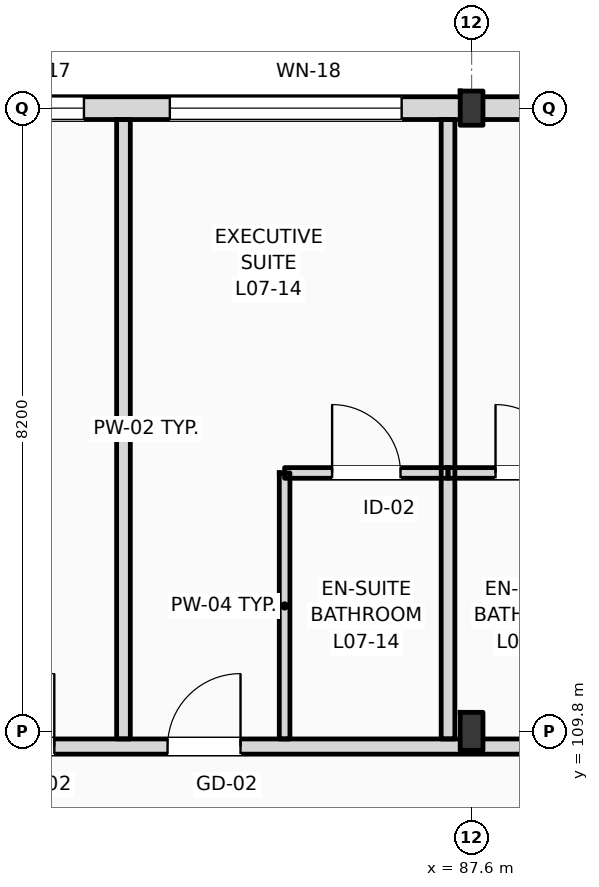
"""IFC4 building model, lengths in metres.
Left out: names, types, materials, properties, quantities, classifications, styles, units other than length and angle.
Written with IfcOpenShell. Run it as: python <this file> out.ifc"""

import sys

from ifc_helpers import new_model, si_unit, direction, frame, frame_2d, origin, origin_2d, place, context, subcontext, project, spatial, rectangle, i_section, extrude, element, fill, save


model = new_model("IFC4")
c1 = context("Model", 3, precision=1e-05, world=origin(), true_north=direction((0.0, 1.0)))
c2 = subcontext(c1, "Body", "Model", "MODEL_VIEW")
j1 = project(units=[si_unit("LENGTHUNIT", "METRE"), si_unit("PLANEANGLEUNIT", "RADIAN")], contexts=[c1])
p1 = place(None, origin())
s1 = spatial("IfcSite", under=j1, at=p1, CompositionType="ELEMENT")
p2 = place(p1, origin())
s2 = spatial("IfcBuilding", under=s1, at=p2, CompositionType="ELEMENT")
p3 = place(p2, frame((0.0, 0.0, 31.8)))
s3 = spatial("IfcBuildingStorey", under=s2, at=p3, CompositionType="ELEMENT", Elevation=31.8)
p4 = place(p3, frame((87.6, 109.8, 0.0), z_axis=(0.0, 0.0, 1.0), x_axis=(1.0, 0.0, 0.0)))
e1 = element("IfcColumn", 1, at=p4, inside=s3, PredefinedType="COLUMN", context=c2, shape_type="SweptSolid", body=[
    extrude(i_section(OverallWidth=0.3, OverallDepth=0.5, WebThickness=0.014, FlangeThickness=0.028, FilletRadius=0.027, at=origin_2d()), origin(), (0.0, 0.0, 1.0), 3.6),
])
p5 = place(p3, frame((87.6, 118.0, 0.0), z_axis=(0.0, 0.0, 1.0), x_axis=(1.0, 0.0, 0.0)))
e2 = element("IfcColumn", 2, at=p5, inside=s3, PredefinedType="COLUMN", context=c2, shape_type="SweptSolid", body=[
    extrude(i_section(OverallWidth=0.3, OverallDepth=0.45, WebThickness=0.014, FlangeThickness=0.026, FilletRadius=0.027, at=origin_2d()), origin(), (0.0, 0.0, 1.0), 3.6),
])
p6 = place(p3, frame((22.5, 118.0, 0.0), z_axis=(0.0, 0.0, 1.0), x_axis=(1.0, 0.0, 0.0)))
e3 = element("IfcWall", 3, at=p6, inside=s3, PredefinedType="STANDARD", context=c2, shape_type="SweptSolid", body=[
    extrude(rectangle(XDim=97.5, YDim=0.3, at=frame_2d((48.75, 0.0))), origin(), (0.0, 0.0, 1.0), 2.72),
])
p7 = place(p6, frame((3.61, 0.0, 0.9)))
e4 = element("IfcOpeningElement", 4, at=p7, cuts=e3, PredefinedType="OPENING", context=c2, shape_type="SweptSolid", body=[
    extrude(rectangle(XDim=1.1, YDim=1.64, at=frame_2d((0.55, 0.82))), frame((0.0, 0.16, 0.0), z_axis=(0.0, -1.0, 0.0), x_axis=(1.0, 0.0, 0.0)), (0.0, 0.0, 1.0), 0.32),
])
p8 = place(p6, frame((6.855, 0.0, 0.0)))
e5 = element("IfcOpeningElement", 5, at=p8, cuts=e3, PredefinedType="OPENING", context=c2, shape_type="SweptSolid", body=[
    extrude(rectangle(XDim=1.2, YDim=2.25, at=frame_2d((0.6, 1.125))), frame((0.0, 0.16, 0.0), z_axis=(0.0, -1.0, 0.0), x_axis=(1.0, 0.0, 0.0)), (0.0, 0.0, 1.0), 0.32),
])
p9 = place(p6, frame((11.405, 0.0, 0.9)))
e6 = element("IfcOpeningElement", 6, at=p9, cuts=e3, PredefinedType="OPENING", context=c2, shape_type="SweptSolid", body=[
    extrude(rectangle(XDim=2.1, YDim=1.64, at=frame_2d((1.05, 0.82))), frame((0.0, 0.16, 0.0), z_axis=(0.0, -1.0, 0.0), x_axis=(1.0, 0.0, 0.0)), (0.0, 0.0, 1.0), 0.32),
])
p10 = place(p6, frame((15.13, 0.0, 0.9)))
e7 = element("IfcOpeningElement", 7, at=p10, cuts=e3, PredefinedType="OPENING", context=c2, shape_type="SweptSolid", body=[
    extrude(rectangle(XDim=2.25, YDim=1.64, at=frame_2d((1.125, 0.82))), frame((0.0, 0.16, 0.0), z_axis=(0.0, -1.0, 0.0), x_axis=(1.0, 0.0, 0.0)), (0.0, 0.0, 1.0), 0.32),
])
p11 = place(p6, frame((21.53, 0.0, 0.0)))
e8 = element("IfcOpeningElement", 8, at=p11, cuts=e3, PredefinedType="OPENING", context=c2, shape_type="SweptSolid", body=[
    extrude(rectangle(XDim=1.2, YDim=2.25, at=frame_2d((0.6, 1.125))), frame((0.0, 0.16, 0.0), z_axis=(0.0, -1.0, 0.0), x_axis=(1.0, 0.0, 0.0)), (0.0, 0.0, 1.0), 0.32),
])
p12 = place(p6, frame((24.18, 0.0, 0.9)))
e9 = element("IfcOpeningElement", 9, at=p12, cuts=e3, PredefinedType="OPENING", context=c2, shape_type="SweptSolid", body=[
    extrude(rectangle(XDim=1.1, YDim=1.64, at=frame_2d((0.55, 0.82))), frame((0.0, 0.16, 0.0), z_axis=(0.0, -1.0, 0.0), x_axis=(1.0, 0.0, 0.0)), (0.0, 0.0, 1.0), 0.32),
])
p13 = place(p6, frame((29.105, 0.0, 0.9)))
e10 = element("IfcOpeningElement", 10, at=p13, cuts=e3, PredefinedType="OPENING", context=c2, shape_type="SweptSolid", body=[
    extrude(rectangle(XDim=2.7, YDim=1.64, at=frame_2d((1.35, 0.82))), frame((0.0, 0.16, 0.0), z_axis=(0.0, -1.0, 0.0), x_axis=(1.0, 0.0, 0.0)), (0.0, 0.0, 1.0), 0.32),
])
p14 = place(p6, frame((34.83, 0.0, 0.9)))
e11 = element("IfcOpeningElement", 11, at=p14, cuts=e3, PredefinedType="OPENING", context=c2, shape_type="SweptSolid", body=[
    extrude(rectangle(XDim=1.8, YDim=1.64, at=frame_2d((0.9, 0.82))), frame((0.0, 0.16, 0.0), z_axis=(0.0, -1.0, 0.0), x_axis=(1.0, 0.0, 0.0)), (0.0, 0.0, 1.0), 0.32),
])
p15 = place(p6, frame((38.525, 0.0, 0.0)))
e12 = element("IfcOpeningElement", 12, at=p15, cuts=e3, PredefinedType="OPENING", context=c2, shape_type="SweptSolid", body=[
    extrude(rectangle(XDim=1.2, YDim=2.25, at=frame_2d((0.6, 1.125))), frame((0.0, 0.16, 0.0), z_axis=(0.0, -1.0, 0.0), x_axis=(1.0, 0.0, 0.0)), (0.0, 0.0, 1.0), 0.32),
])
p16 = place(p6, frame((42.73, 0.0, 0.9)))
e13 = element("IfcOpeningElement", 13, at=p16, cuts=e3, PredefinedType="OPENING", context=c2, shape_type="SweptSolid", body=[
    extrude(rectangle(XDim=3.05, YDim=1.64, at=frame_2d((1.525, 0.82))), frame((0.0, 0.16, 0.0), z_axis=(0.0, -1.0, 0.0), x_axis=(1.0, 0.0, 0.0)), (0.0, 0.0, 1.0), 0.32),
])
p17 = place(p6, frame((47.155, 0.0, 0.9)))
e14 = element("IfcOpeningElement", 14, at=p17, cuts=e3, PredefinedType="OPENING", context=c2, shape_type="SweptSolid", body=[
    extrude(rectangle(XDim=1.35, YDim=1.64, at=frame_2d((0.675, 0.82))), frame((0.0, 0.16, 0.0), z_axis=(0.0, -1.0, 0.0), x_axis=(1.0, 0.0, 0.0)), (0.0, 0.0, 1.0), 0.32),
])
p18 = place(p6, frame((53.065, 0.0, 0.0)))
e15 = element("IfcOpeningElement", 15, at=p18, cuts=e3, PredefinedType="OPENING", context=c2, shape_type="SweptSolid", body=[
    extrude(rectangle(XDim=1.2, YDim=2.25, at=frame_2d((0.6, 1.125))), frame((0.0, 0.16, 0.0), z_axis=(0.0, -1.0, 0.0), x_axis=(1.0, 0.0, 0.0)), (0.0, 0.0, 1.0), 0.32),
])
p19 = place(p6, frame((58.2, 0.0, 0.9)))
e16 = element("IfcOpeningElement", 16, at=p19, cuts=e3, PredefinedType="OPENING", context=c2, shape_type="SweptSolid", body=[
    extrude(rectangle(XDim=1.8, YDim=1.64, at=frame_2d((0.9, 0.82))), frame((0.0, 0.16, 0.0), z_axis=(0.0, -1.0, 0.0), x_axis=(1.0, 0.0, 0.0)), (0.0, 0.0, 1.0), 0.32),
])
p20 = place(p6, frame((61.13, 0.0, 0.9)))
e17 = element("IfcOpeningElement", 17, at=p20, cuts=e3, PredefinedType="OPENING", context=c2, shape_type="SweptSolid", body=[
    extrude(rectangle(XDim=3.05, YDim=1.64, at=frame_2d((1.525, 0.82))), frame((0.0, 0.16, 0.0), z_axis=(0.0, -1.0, 0.0), x_axis=(1.0, 0.0, 0.0)), (0.0, 0.0, 1.0), 0.32),
])
p21 = place(p6, frame((67.93, 0.0, 0.0)))
e18 = element("IfcOpeningElement", 18, at=p21, cuts=e3, PredefinedType="OPENING", context=c2, shape_type="SweptSolid", body=[
    extrude(rectangle(XDim=1.2, YDim=2.25, at=frame_2d((0.6, 1.125))), frame((0.0, 0.16, 0.0), z_axis=(0.0, -1.0, 0.0), x_axis=(1.0, 0.0, 0.0)), (0.0, 0.0, 1.0), 0.32),
])
p22 = place(p6, frame((70.39, 0.0, 0.0)))
e19 = element("IfcOpeningElement", 19, at=p22, cuts=e3, PredefinedType="OPENING", context=c2, shape_type="SweptSolid", body=[
    extrude(rectangle(XDim=1.2, YDim=2.25, at=frame_2d((0.6, 1.125))), frame((0.0, 0.16, 0.0), z_axis=(0.0, -1.0, 0.0), x_axis=(1.0, 0.0, 0.0)), (0.0, 0.0, 1.0), 0.32),
])
p23 = place(p6, frame((75.905, 0.0, 0.9)))
e20 = element("IfcOpeningElement", 20, at=p23, cuts=e3, PredefinedType="OPENING", context=c2, shape_type="SweptSolid", body=[
    extrude(rectangle(XDim=1.1, YDim=1.5, at=frame_2d((0.55, 0.75))), frame((0.0, 0.16, 0.0), z_axis=(0.0, -1.0, 0.0), x_axis=(1.0, 0.0, 0.0)), (0.0, 0.0, 1.0), 0.32),
])
p24 = place(p6, frame((81.63, 0.0, 0.9)))
e21 = element("IfcOpeningElement", 21, at=p24, cuts=e3, PredefinedType="OPENING", context=c2, shape_type="SweptSolid", body=[
    extrude(rectangle(XDim=1.1, YDim=1.6, at=frame_2d((0.55, 0.8))), frame((0.0, 0.16, 0.0), z_axis=(0.0, -1.0, 0.0), x_axis=(1.0, 0.0, 0.0)), (0.0, 0.0, 1.0), 0.32),
])
p25 = place(p6, frame((84.955, 0.0, 0.9)))
e22 = element("IfcOpeningElement", 22, at=p25, cuts=e3, PredefinedType="OPENING", context=c2, shape_type="SweptSolid", body=[
    extrude(rectangle(XDim=1.4, YDim=1.64, at=frame_2d((0.7, 0.82))), frame((0.0, 0.16, 0.0), z_axis=(0.0, -1.0, 0.0), x_axis=(1.0, 0.0, 0.0)), (0.0, 0.0, 1.0), 0.32),
])
p26 = place(p6, frame((90.055, 0.0, 0.9)))
e23 = element("IfcOpeningElement", 23, at=p26, cuts=e3, PredefinedType="OPENING", context=c2, shape_type="SweptSolid", body=[
    extrude(rectangle(XDim=1.6, YDim=1.64, at=frame_2d((0.8, 0.82))), frame((0.0, 0.16, 0.0), z_axis=(0.0, -1.0, 0.0), x_axis=(1.0, 0.0, 0.0)), (0.0, 0.0, 1.0), 0.32),
])
p27 = place(p6, frame((93.87, 0.0, 0.9)))
e24 = element("IfcOpeningElement", 24, at=p27, cuts=e3, PredefinedType="OPENING", context=c2, shape_type="SweptSolid", body=[
    extrude(rectangle(XDim=1.75, YDim=1.64, at=frame_2d((0.875, 0.82))), frame((0.0, 0.16, 0.0), z_axis=(0.0, -1.0, 0.0), x_axis=(1.0, 0.0, 0.0)), (0.0, 0.0, 1.0), 0.32),
])
p28 = place(p3, frame((10.65, 109.6, 0.0), z_axis=(0.0, 0.0, 1.0), x_axis=(1.0, 0.0, 0.0)))
e25 = element("IfcWall", 25, at=p28, inside=s3, PredefinedType="PARTITIONING", context=c2, shape_type="SweptSolid", body=[
    extrude(rectangle(XDim=109.21, YDim=0.2, at=frame_2d((54.605, 0.0))), origin(), (0.0, 0.0, 1.0), 2.72),
])
p29 = place(p28, frame((15.825, 0.0, 0.0)))
e26 = element("IfcOpeningElement", 26, at=p29, cuts=e25, PredefinedType="OPENING", context=c2, shape_type="SweptSolid", body=[
    extrude(rectangle(XDim=1.02, YDim=2.2, at=frame_2d((0.51, 1.1))), frame((0.0, 0.11, 0.0), z_axis=(0.0, -1.0, 0.0), x_axis=(1.0, 0.0, 0.0)), (0.0, 0.0, 1.0), 0.22),
])
p30 = place(p28, frame((19.87, 0.0, 0.0)))
e27 = element("IfcOpeningElement", 27, at=p30, cuts=e25, PredefinedType="OPENING", context=c2, shape_type="SweptSolid", body=[
    extrude(rectangle(XDim=1.02, YDim=2.2, at=frame_2d((0.51, 1.1))), frame((0.0, 0.11, 0.0), z_axis=(0.0, -1.0, 0.0), x_axis=(1.0, 0.0, 0.0)), (0.0, 0.0, 1.0), 0.22),
])
p31 = place(p28, frame((24.47, 0.0, 0.0)))
e28 = element("IfcOpeningElement", 28, at=p31, cuts=e25, PredefinedType="OPENING", context=c2, shape_type="SweptSolid", body=[
    extrude(rectangle(XDim=1.02, YDim=2.2, at=frame_2d((0.51, 1.1))), frame((0.0, 0.11, 0.0), z_axis=(0.0, -1.0, 0.0), x_axis=(1.0, 0.0, 0.0)), (0.0, 0.0, 1.0), 0.22),
])
p32 = place(p28, frame((26.92, 0.0, 0.0)))
e29 = element("IfcOpeningElement", 29, at=p32, cuts=e25, PredefinedType="OPENING", context=c2, shape_type="SweptSolid", body=[
    extrude(rectangle(XDim=1.02, YDim=2.2, at=frame_2d((0.51, 1.1))), frame((0.0, 0.11, 0.0), z_axis=(0.0, -1.0, 0.0), x_axis=(1.0, 0.0, 0.0)), (0.0, 0.0, 1.0), 0.22),
])
p33 = place(p28, frame((33.7, 0.0, 0.0)))
e30 = element("IfcOpeningElement", 30, at=p33, cuts=e25, PredefinedType="OPENING", context=c2, shape_type="SweptSolid", body=[
    extrude(rectangle(XDim=0.96, YDim=2.2, at=frame_2d((0.48, 1.1))), frame((0.0, 0.11, 0.0), z_axis=(0.0, -1.0, 0.0), x_axis=(1.0, 0.0, 0.0)), (0.0, 0.0, 1.0), 0.22),
])
p34 = place(p28, frame((35.9, 0.0, 0.0)))
e31 = element("IfcOpeningElement", 31, at=p34, cuts=e25, PredefinedType="OPENING", context=c2, shape_type="SweptSolid", body=[
    extrude(rectangle(XDim=0.96, YDim=2.2, at=frame_2d((0.48, 1.1))), frame((0.0, 0.11, 0.0), z_axis=(0.0, -1.0, 0.0), x_axis=(1.0, 0.0, 0.0)), (0.0, 0.0, 1.0), 0.22),
])
p35 = place(p28, frame((42.9, 0.0, 0.0)))
e32 = element("IfcOpeningElement", 32, at=p35, cuts=e25, PredefinedType="OPENING", context=c2, shape_type="SweptSolid", body=[
    extrude(rectangle(XDim=0.96, YDim=2.2, at=frame_2d((0.48, 1.1))), frame((0.0, 0.11, 0.0), z_axis=(0.0, -1.0, 0.0), x_axis=(1.0, 0.0, 0.0)), (0.0, 0.0, 1.0), 0.22),
])
p36 = place(p28, frame((47.5, 0.0, 0.0)))
e33 = element("IfcOpeningElement", 33, at=p36, cuts=e25, PredefinedType="OPENING", context=c2, shape_type="SweptSolid", body=[
    extrude(rectangle(XDim=0.96, YDim=2.2, at=frame_2d((0.48, 1.1))), frame((0.0, 0.11, 0.0), z_axis=(0.0, -1.0, 0.0), x_axis=(1.0, 0.0, 0.0)), (0.0, 0.0, 1.0), 0.22),
])
p37 = place(p28, frame((49.95, 0.0, 0.0)))
e34 = element("IfcOpeningElement", 34, at=p37, cuts=e25, PredefinedType="OPENING", context=c2, shape_type="SweptSolid", body=[
    extrude(rectangle(XDim=0.96, YDim=2.2, at=frame_2d((0.48, 1.1))), frame((0.0, 0.11, 0.0), z_axis=(0.0, -1.0, 0.0), x_axis=(1.0, 0.0, 0.0)), (0.0, 0.0, 1.0), 0.22),
])
p38 = place(p28, frame((56.7, 0.0, 0.0)))
e35 = element("IfcOpeningElement", 35, at=p38, cuts=e25, PredefinedType="OPENING", context=c2, shape_type="SweptSolid", body=[
    extrude(rectangle(XDim=0.96, YDim=2.2, at=frame_2d((0.48, 1.1))), frame((0.0, 0.11, 0.0), z_axis=(0.0, -1.0, 0.0), x_axis=(1.0, 0.0, 0.0)), (0.0, 0.0, 1.0), 0.22),
])
p39 = place(p28, frame((59.15, 0.0, 0.0)))
e36 = element("IfcOpeningElement", 36, at=p39, cuts=e25, PredefinedType="OPENING", context=c2, shape_type="SweptSolid", body=[
    extrude(rectangle(XDim=0.96, YDim=2.2, at=frame_2d((0.48, 1.1))), frame((0.0, 0.11, 0.0), z_axis=(0.0, -1.0, 0.0), x_axis=(1.0, 0.0, 0.0)), (0.0, 0.0, 1.0), 0.22),
])
p40 = place(p28, frame((65.9, 0.0, 0.0)))
e37 = element("IfcOpeningElement", 37, at=p40, cuts=e25, PredefinedType="OPENING", context=c2, shape_type="SweptSolid", body=[
    extrude(rectangle(XDim=0.96, YDim=2.2, at=frame_2d((0.48, 1.1))), frame((0.0, 0.11, 0.0), z_axis=(0.0, -1.0, 0.0), x_axis=(1.0, 0.0, 0.0)), (0.0, 0.0, 1.0), 0.22),
])
p41 = place(p28, frame((70.5, 0.0, 0.0)))
e38 = element("IfcOpeningElement", 38, at=p41, cuts=e25, PredefinedType="OPENING", context=c2, shape_type="SweptSolid", body=[
    extrude(rectangle(XDim=0.96, YDim=2.2, at=frame_2d((0.48, 1.1))), frame((0.0, 0.11, 0.0), z_axis=(0.0, -1.0, 0.0), x_axis=(1.0, 0.0, 0.0)), (0.0, 0.0, 1.0), 0.22),
])
p42 = place(p28, frame((72.95, 0.0, 0.0)))
e39 = element("IfcOpeningElement", 39, at=p42, cuts=e25, PredefinedType="OPENING", context=c2, shape_type="SweptSolid", body=[
    extrude(rectangle(XDim=0.96, YDim=2.2, at=frame_2d((0.48, 1.1))), frame((0.0, 0.11, 0.0), z_axis=(0.0, -1.0, 0.0), x_axis=(1.0, 0.0, 0.0)), (0.0, 0.0, 1.0), 0.22),
])
p43 = place(p28, frame((79.7, 0.0, 0.0)))
e40 = element("IfcOpeningElement", 40, at=p43, cuts=e25, PredefinedType="OPENING", context=c2, shape_type="SweptSolid", body=[
    extrude(rectangle(XDim=0.96, YDim=2.2, at=frame_2d((0.48, 1.1))), frame((0.0, 0.11, 0.0), z_axis=(0.0, -1.0, 0.0), x_axis=(1.0, 0.0, 0.0)), (0.0, 0.0, 1.0), 0.22),
])
p44 = place(p28, frame((82.15, 0.0, 0.0)))
e41 = element("IfcOpeningElement", 41, at=p44, cuts=e25, PredefinedType="OPENING", context=c2, shape_type="SweptSolid", body=[
    extrude(rectangle(XDim=0.96, YDim=2.2, at=frame_2d((0.48, 1.1))), frame((0.0, 0.11, 0.0), z_axis=(0.0, -1.0, 0.0), x_axis=(1.0, 0.0, 0.0)), (0.0, 0.0, 1.0), 0.22),
])
p45 = place(p28, frame((88.9, 0.0, 0.0)))
e42 = element("IfcOpeningElement", 42, at=p45, cuts=e25, PredefinedType="OPENING", context=c2, shape_type="SweptSolid", body=[
    extrude(rectangle(XDim=0.96, YDim=2.2, at=frame_2d((0.48, 1.1))), frame((0.0, 0.11, 0.0), z_axis=(0.0, -1.0, 0.0), x_axis=(1.0, 0.0, 0.0)), (0.0, 0.0, 1.0), 0.22),
])
p46 = place(p28, frame((93.75, 0.0, 0.0)))
e43 = element("IfcOpeningElement", 43, at=p46, cuts=e25, PredefinedType="OPENING", context=c2, shape_type="SweptSolid", body=[
    extrude(rectangle(XDim=0.96, YDim=2.2, at=frame_2d((0.48, 1.1))), frame((0.0, 0.11, 0.0), z_axis=(0.0, -1.0, 0.0), x_axis=(1.0, 0.0, 0.0)), (0.0, 0.0, 1.0), 0.22),
])
p47 = place(p28, frame((98.1, 0.0, 0.0)))
e44 = element("IfcOpeningElement", 44, at=p47, cuts=e25, PredefinedType="OPENING", context=c2, shape_type="SweptSolid", body=[
    extrude(rectangle(XDim=0.96, YDim=2.2, at=frame_2d((0.48, 1.1))), frame((0.0, 0.11, 0.0), z_axis=(0.0, -1.0, 0.0), x_axis=(1.0, 0.0, 0.0)), (0.0, 0.0, 1.0), 0.22),
])
p48 = place(p28, frame((102.7, 0.0, 0.0)))
e45 = element("IfcOpeningElement", 45, at=p48, cuts=e25, PredefinedType="OPENING", context=c2, shape_type="SweptSolid", body=[
    extrude(rectangle(XDim=0.96, YDim=2.2, at=frame_2d((0.48, 1.1))), frame((0.0, 0.11, 0.0), z_axis=(0.0, -1.0, 0.0), x_axis=(1.0, 0.0, 0.0)), (0.0, 0.0, 1.0), 0.22),
])
p49 = place(p28, frame((105.04, 0.0, 0.0)))
e46 = element("IfcOpeningElement", 46, at=p49, cuts=e25, PredefinedType="OPENING", context=c2, shape_type="SweptSolid", body=[
    extrude(rectangle(XDim=0.96, YDim=2.2, at=frame_2d((0.48, 1.1))), frame((0.0, 0.11, 0.0), z_axis=(0.0, -1.0, 0.0), x_axis=(1.0, 0.0, 0.0)), (0.0, 0.0, 1.0), 0.22),
])
p50 = place(p28, frame((2.716, 0.0, 0.0)))
e47 = element("IfcOpeningElement", 47, at=p50, cuts=e25, PredefinedType="OPENING", context=c2, shape_type="SweptSolid", body=[
    extrude(rectangle(XDim=1.35, YDim=2.25, at=frame_2d((0.675, 1.125))), frame((0.0, 0.11, 0.0), z_axis=(0.0, -1.0, 0.0), x_axis=(1.0, 0.0, 0.0)), (0.0, 0.0, 1.0), 0.22),
])
p51 = place(p28, frame((6.65, 0.0, 0.0)))
e48 = element("IfcOpeningElement", 48, at=p51, cuts=e25, PredefinedType="OPENING", context=c2, shape_type="SweptSolid", body=[
    extrude(rectangle(XDim=1.35, YDim=2.25, at=frame_2d((0.675, 1.125))), frame((0.0, 0.11, 0.0), z_axis=(0.0, -1.0, 0.0), x_axis=(1.0, 0.0, 0.0)), (0.0, 0.0, 1.0), 0.22),
])
p52 = place(p28, frame((10.583, 0.0, 0.0)))
e49 = element("IfcOpeningElement", 49, at=p52, cuts=e25, PredefinedType="OPENING", context=c2, shape_type="SweptSolid", body=[
    extrude(rectangle(XDim=1.35, YDim=2.25, at=frame_2d((0.675, 1.125))), frame((0.0, 0.11, 0.0), z_axis=(0.0, -1.0, 0.0), x_axis=(1.0, 0.0, 0.0)), (0.0, 0.0, 1.0), 0.22),
])
for number, where, z_axis, x_axis in (
    (50, (83.02, 109.7, 0.0), (0.0, 0.0, 1.0), (0.0, 1.0, 0.0)),
    (51, (87.29, 109.7, 0.0), (0.0, 0.0, 1.0), (0.0, 1.0, 0.0)),
):
    element("IfcWall", number, at=place(p3, frame(where, z_axis=z_axis, x_axis=x_axis)), inside=s3, PredefinedType="PARTITIONING", context=c2, shape_type="SweptSolid", body=[
        extrude(rectangle(XDim=8.15, YDim=0.18, at=frame_2d((4.075, 0.0))), origin(), (0.0, 0.0, 1.0), 3.36),
    ])
p53 = place(p3, frame((85.14, 109.7, 0.0), z_axis=(0.0, 0.0, 1.0), x_axis=(0.0, 1.0, 0.0)))
e52 = element("IfcWall", 52, at=p53, inside=s3, PredefinedType="PARTITIONING", context=c2, shape_type="SweptSolid", body=[
    extrude(rectangle(XDim=3.5, YDim=0.14, at=frame_2d((1.75, 0.0))), origin(), (0.0, 0.0, 1.0), 3.05),
])
p54 = place(p3, frame((85.14, 113.2, 0.0), z_axis=(0.0, 0.0, 1.0), x_axis=(1.0, 0.0, 0.0)))
e53 = element("IfcWall", 53, at=p54, inside=s3, PredefinedType="PARTITIONING", context=c2, shape_type="SweptSolid", body=[
    extrude(rectangle(XDim=2.15, YDim=0.14, at=frame_2d((1.075, 0.0))), origin(), (0.0, 0.0, 1.0), 3.36),
])
p55 = place(p54, frame((0.625, 0.0, 0.0)))
e54 = element("IfcOpeningElement", 54, at=p55, cuts=e53, PredefinedType="OPENING", context=c2, shape_type="SweptSolid", body=[
    extrude(rectangle(XDim=0.9, YDim=2.1, at=frame_2d((0.45, 1.05))), frame((0.0, 0.08, 0.0), z_axis=(0.0, -1.0, 0.0), x_axis=(1.0, 0.0, 0.0)), (0.0, 0.0, 1.0), 0.16),
])
p56 = place(p3, frame((87.29, 113.2, 0.0), z_axis=(0.0, 0.0, 1.0), x_axis=(1.0, 0.0, 0.0)))
e55 = element("IfcWall", 55, at=p56, inside=s3, PredefinedType="PARTITIONING", context=c2, shape_type="SweptSolid", body=[
    extrude(rectangle(XDim=2.15, YDim=0.14, at=frame_2d((1.075, 0.0))), origin(), (0.0, 0.0, 1.0), 3.36),
])
p57 = place(p56, frame((0.625, 0.0, 0.0)))
e56 = element("IfcOpeningElement", 56, at=p57, cuts=e55, PredefinedType="OPENING", context=c2, shape_type="SweptSolid", body=[
    extrude(rectangle(XDim=0.9, YDim=2.1, at=frame_2d((0.45, 1.05))), frame((0.0, 0.08, 0.0), z_axis=(0.0, -1.0, 0.0), x_axis=(1.0, 0.0, 0.0)), (0.0, 0.0, 1.0), 0.16),
])
p58 = place(p19, origin())
e57 = element("IfcWindow", 57, at=p58, inside=s3, PartitioningType="DOUBLE_PANEL_VERTICAL", PredefinedType="WINDOW", context=c2, shape_type="SweptSolid", body=[
    extrude(rectangle(XDim=1.8, YDim=1.64, at=frame_2d((0.9, 0.82))), frame((0.0, 0.03, 0.0), z_axis=(0.0, -1.0, 0.0), x_axis=(1.0, 0.0, 0.0)), (0.0, 0.0, 1.0), 0.06),
])
fill(e16, e57)
p59 = place(p20, origin())
e58 = element("IfcWindow", 58, at=p59, inside=s3, PartitioningType="DOUBLE_PANEL_VERTICAL", PredefinedType="WINDOW", context=c2, shape_type="SweptSolid", body=[
    extrude(rectangle(XDim=3.05, YDim=1.64, at=frame_2d((1.525, 0.82))), frame((0.0, 0.03, 0.0), z_axis=(0.0, -1.0, 0.0), x_axis=(1.0, 0.0, 0.0)), (0.0, 0.0, 1.0), 0.06),
])
fill(e17, e58)
p60 = place(p41, origin())
e59 = element("IfcDoor", 59, at=p60, inside=s3, OperationType="SINGLE_SWING_RIGHT", PredefinedType="DOOR", context=c2, shape_type="SweptSolid", body=[
    extrude(rectangle(XDim=0.96, YDim=2.2, at=frame_2d((0.48, 1.1))), frame((0.0, 0.025, 0.0), z_axis=(0.0, -1.0, 0.0), x_axis=(1.0, 0.0, 0.0)), (0.0, 0.0, 1.0), 0.05),
])
fill(e38, e59)
p61 = place(p42, origin())
e60 = element("IfcDoor", 60, at=p61, inside=s3, OperationType="SINGLE_SWING_RIGHT", PredefinedType="DOOR", context=c2, shape_type="SweptSolid", body=[
    extrude(rectangle(XDim=0.96, YDim=2.2, at=frame_2d((0.48, 1.1))), frame((0.0, 0.025, 0.0), z_axis=(0.0, -1.0, 0.0), x_axis=(1.0, 0.0, 0.0)), (0.0, 0.0, 1.0), 0.05),
])
fill(e39, e60)
p62 = place(p55, origin())
e61 = element("IfcDoor", 61, at=p62, inside=s3, OperationType="SINGLE_SWING_LEFT", PredefinedType="DOOR", context=c2, shape_type="SweptSolid", body=[
    extrude(rectangle(XDim=0.9, YDim=2.1, at=frame_2d((0.45, 1.05))), frame((0.0, 0.025, 0.0), z_axis=(0.0, -1.0, 0.0), x_axis=(1.0, 0.0, 0.0)), (0.0, 0.0, 1.0), 0.05),
])
fill(e54, e61)
p63 = place(p57, origin())
e62 = element("IfcDoor", 62, at=p63, inside=s3, OperationType="SINGLE_SWING_LEFT", PredefinedType="DOOR", context=c2, shape_type="SweptSolid", body=[
    extrude(rectangle(XDim=0.9, YDim=2.1, at=frame_2d((0.45, 1.05))), frame((0.0, 0.025, 0.0), z_axis=(0.0, -1.0, 0.0), x_axis=(1.0, 0.0, 0.0)), (0.0, 0.0, 1.0), 0.05),
])
fill(e56, e62)
save(model, sys.argv[1])
